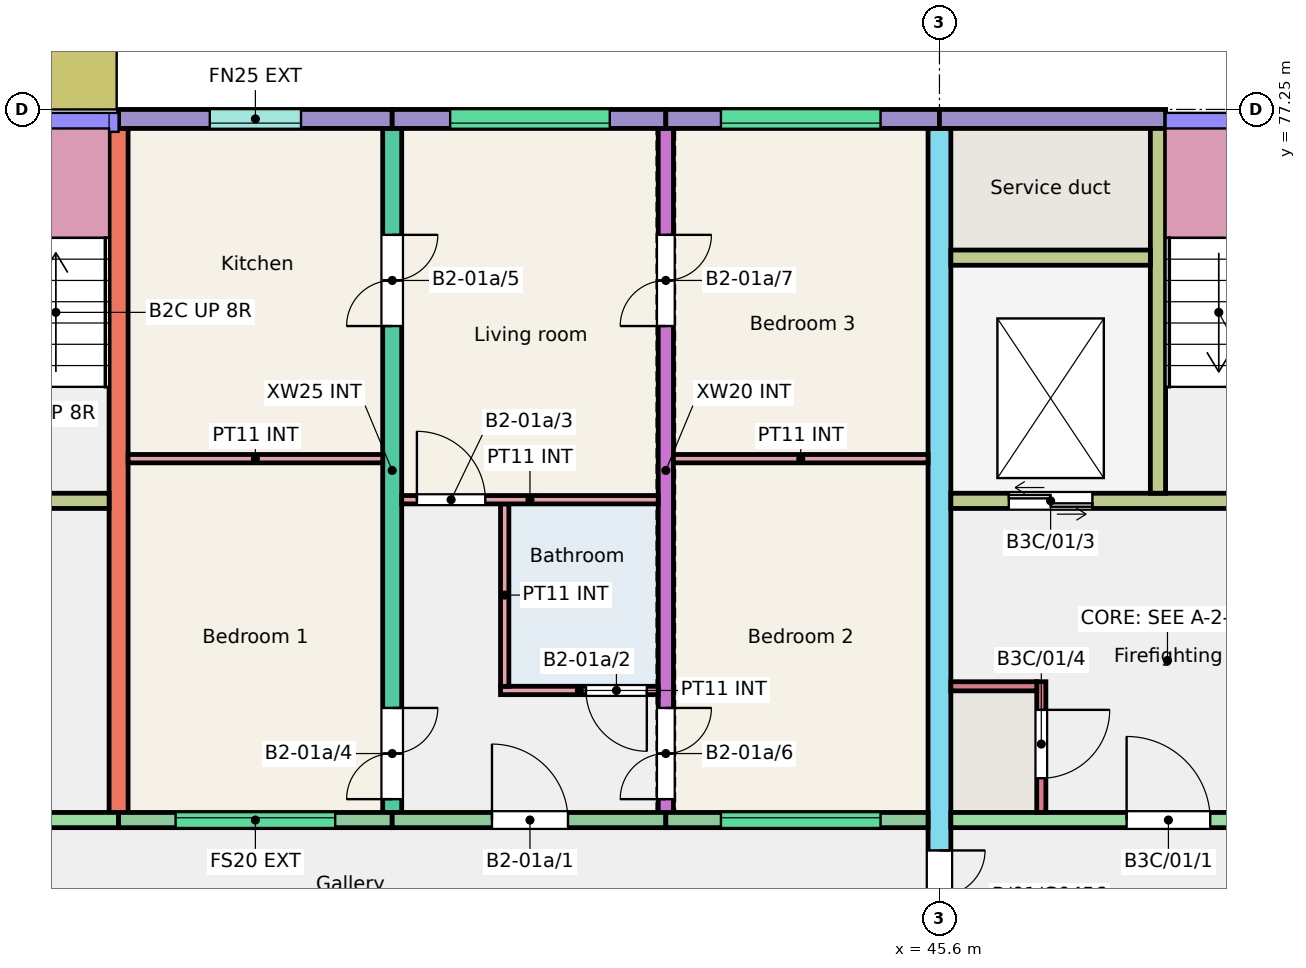
"""IFC4 building model, lengths in metres.
Left out: names, types, materials, properties, quantities, classifications, styles, units other than length and angle.
Written with IfcOpenShell. Run it as: python <this file> out.ifc"""

import sys

from ifc_helpers import new_model, si_unit, direction, frame, frame_2d, origin, place, context, subcontext, project, spatial, rectangle, extrude, element, fill, save


model = new_model("IFC4")
c1 = context("Model", 3, precision=1e-05, world=origin(), true_north=direction((0.0, 1.0)))
c2 = subcontext(c1, "Body", "Model", "MODEL_VIEW")
j1 = project(units=[si_unit("LENGTHUNIT", "METRE"), si_unit("PLANEANGLEUNIT", "RADIAN")], contexts=[c1])
p1 = place(None, origin())
s1 = spatial("IfcSite", under=j1, at=p1, CompositionType="ELEMENT")
p2 = place(p1, origin())
s2 = spatial("IfcBuilding", under=s1, at=p2, CompositionType="ELEMENT")
p3 = place(p2, frame((0.0, 0.0, 3.0)))
s3 = spatial("IfcBuildingStorey", under=s2, at=p3, CompositionType="ELEMENT", Elevation=3.0)
p4 = place(p3, frame((34.8, 68.0, 0.0), z_axis=(0.0, 0.0, 1.0), x_axis=(0.0, 1.0, 0.0)))
e1 = element("IfcWall", 1, at=p4, inside=s3, PredefinedType="SHEAR", context=c2, shape_type="SweptSolid", body=[
    extrude(rectangle(XDim=9.0, YDim=0.25, at=frame_2d((4.5, 0.0))), origin(), (0.0, 0.0, 1.0), 3.0),
])
p5 = place(p3, frame((38.4, 68.0, 0.0), z_axis=(0.0, 0.0, 1.0), x_axis=(0.0, 1.0, 0.0)))
e2 = element("IfcWall", 2, at=p5, inside=s3, PredefinedType="SHEAR", context=c2, shape_type="SweptSolid", body=[
    extrude(rectangle(XDim=9.0, YDim=0.25, at=frame_2d((4.5, 0.0))), origin(), (0.0, 0.0, 1.0), 3.0),
])
p6 = place(p5, frame((0.175, 0.0, 0.0)))
e3 = element("IfcOpeningElement", 3, at=p6, cuts=e2, PredefinedType="OPENING", context=c2, shape_type="SweptSolid", body=[
    extrude(rectangle(XDim=1.2, YDim=2.1, at=frame_2d((0.6, 1.05))), frame((0.0, 0.135, 0.0), z_axis=(0.0, -1.0, 0.0), x_axis=(1.0, 0.0, 0.0)), (0.0, 0.0, 1.0), 0.27),
])
p7 = place(p5, frame((6.4, 0.0, 0.0)))
e4 = element("IfcOpeningElement", 4, at=p7, cuts=e2, PredefinedType="OPENING", context=c2, shape_type="SweptSolid", body=[
    extrude(rectangle(XDim=1.2, YDim=2.1, at=frame_2d((0.6, 1.05))), frame((0.0, 0.135, 0.0), z_axis=(0.0, -1.0, 0.0), x_axis=(1.0, 0.0, 0.0)), (0.0, 0.0, 1.0), 0.27),
])
p8 = place(p3, frame((42.0, 68.0, 0.0), z_axis=(0.0, 0.0, 1.0), x_axis=(0.0, 1.0, 0.0)))
e5 = element("IfcWall", 5, at=p8, inside=s3, PredefinedType="SHEAR", context=c2, shape_type="SweptSolid", body=[
    extrude(rectangle(XDim=9.0, YDim=0.2, at=frame_2d((4.5, 0.0))), origin(), (0.0, 0.0, 1.0), 3.0),
])
p9 = place(p8, frame((0.175, 0.0, 0.0)))
e6 = element("IfcOpeningElement", 6, at=p9, cuts=e5, PredefinedType="OPENING", context=c2, shape_type="SweptSolid", body=[
    extrude(rectangle(XDim=1.2, YDim=2.1, at=frame_2d((0.6, 1.05))), frame((0.0, 0.11, 0.0), z_axis=(0.0, -1.0, 0.0), x_axis=(1.0, 0.0, 0.0)), (0.0, 0.0, 1.0), 0.22),
])
p10 = place(p8, frame((6.4, 0.0, 0.0)))
e7 = element("IfcOpeningElement", 7, at=p10, cuts=e5, PredefinedType="OPENING", context=c2, shape_type="SweptSolid", body=[
    extrude(rectangle(XDim=1.2, YDim=2.1, at=frame_2d((0.6, 1.05))), frame((0.0, 0.11, 0.0), z_axis=(0.0, -1.0, 0.0), x_axis=(1.0, 0.0, 0.0)), (0.0, 0.0, 1.0), 0.22),
])
p11 = place(p3, frame((45.6, 66.0, 0.0), z_axis=(0.0, 0.0, 1.0), x_axis=(0.0, 1.0, 0.0)))
e8 = element("IfcWall", 8, at=p11, inside=s3, PredefinedType="SHEAR", context=c2, shape_type="SweptSolid", body=[
    extrude(rectangle(XDim=11.0, YDim=0.3, at=frame_2d((5.5, 0.0))), origin(), (0.0, 0.0, 1.0), 3.0),
])
p12 = place(p11, frame((0.3, 0.0, 0.0)))
e9 = element("IfcOpeningElement", 9, at=p12, cuts=e8, PredefinedType="OPENING", context=c2, shape_type="SweptSolid", body=[
    extrude(rectangle(XDim=1.2, YDim=2.1, at=frame_2d((0.6, 1.05))), frame((0.0, 0.16, 0.0), z_axis=(0.0, -1.0, 0.0), x_axis=(1.0, 0.0, 0.0)), (0.0, 0.0, 1.0), 0.32),
])
p13 = place(p3, frame((28.95, 67.9, 0.0), z_axis=(0.0, 0.0, 1.0), x_axis=(1.0, 0.0, 0.0)))
e10 = element("IfcWall", 10, at=p13, inside=s3, PredefinedType="SHEAR", context=c2, shape_type="SweptSolid", body=[
    extrude(rectangle(XDim=5.85, YDim=0.2, at=frame_2d((2.925, 0.0))), origin(), (0.0, 0.0, 1.0), 3.0),
])
p14 = place(p13, frame((2.312, 0.0, 0.0)))
e11 = element("IfcOpeningElement", 11, at=p14, cuts=e10, PredefinedType="OPENING", context=c2, shape_type="SweptSolid", body=[
    extrude(rectangle(XDim=1.1, YDim=2.1, at=frame_2d((0.55, 1.05))), frame((0.0, 0.11, 0.0), z_axis=(0.0, -1.0, 0.0), x_axis=(1.0, 0.0, 0.0)), (0.0, 0.0, 1.0), 0.22),
])
p15 = place(p3, frame((28.95, 72.1, 0.0), z_axis=(0.0, 0.0, 1.0), x_axis=(1.0, 0.0, 0.0)))
e12 = element("IfcWall", 12, at=p15, inside=s3, PredefinedType="SHEAR", context=c2, shape_type="SweptSolid", body=[
    extrude(rectangle(XDim=5.725, YDim=0.2, at=frame_2d((2.863, 0.0))), origin(), (0.0, 0.0, 1.0), 3.0),
])
p16 = place(p15, frame((3.775, 0.0, 0.0)))
e13 = element("IfcOpeningElement", 13, at=p16, cuts=e12, PredefinedType="OPENING", context=c2, shape_type="SweptSolid", body=[
    extrude(rectangle(XDim=1.0, YDim=2.1, at=frame_2d((0.5, 1.05))), frame((0.0, 0.11, 0.0), z_axis=(0.0, -1.0, 0.0), x_axis=(1.0, 0.0, 0.0)), (0.0, 0.0, 1.0), 0.22),
])
p17 = place(p15, frame((0.762, 0.0, 0.0)))
e14 = element("IfcOpeningElement", 14, at=p17, cuts=e12, PredefinedType="OPENING", context=c2, shape_type="SweptSolid", body=[
    extrude(rectangle(XDim=1.1, YDim=2.1, at=frame_2d((0.55, 1.05))), frame((0.0, 0.11, 0.0), z_axis=(0.0, -1.0, 0.0), x_axis=(1.0, 0.0, 0.0)), (0.0, 0.0, 1.0), 0.22),
])
p18 = place(p3, frame((34.8, 77.125, 0.0), z_axis=(0.0, 0.0, 1.0), x_axis=(1.0, 0.0, 0.0)))
e15 = element("IfcWall", 15, at=p18, inside=s3, PredefinedType="SOLIDWALL", context=c2, shape_type="SweptSolid", body=[
    extrude(rectangle(XDim=3.6, YDim=0.25, at=frame_2d((1.8, 0.0))), origin(), (0.0, 0.0, 1.0), 3.0),
])
p19 = place(p18, frame((1.2, 0.0, 1.1)))
e16 = element("IfcOpeningElement", 16, at=p19, cuts=e15, PredefinedType="OPENING", context=c2, shape_type="SweptSolid", body=[
    extrude(rectangle(XDim=1.2, YDim=1.3, at=frame_2d((0.6, 0.65))), frame((0.0, 0.135, 0.0), z_axis=(0.0, -1.0, 0.0), x_axis=(1.0, 0.0, 0.0)), (0.0, 0.0, 1.0), 0.27),
])
p20 = place(p3, frame((34.8, 67.9, 0.0), z_axis=(0.0, 0.0, 1.0), x_axis=(1.0, 0.0, 0.0)))
e17 = element("IfcWall", 17, at=p20, inside=s3, PredefinedType="SOLIDWALL", context=c2, shape_type="SweptSolid", body=[
    extrude(rectangle(XDim=3.6, YDim=0.2, at=frame_2d((1.8, 0.0))), origin(), (0.0, 0.0, 1.0), 3.0),
])
p21 = place(p20, frame((0.75, 0.0, 1.2)))
e18 = element("IfcOpeningElement", 18, at=p21, cuts=e17, PredefinedType="OPENING", context=c2, shape_type="SweptSolid", body=[
    extrude(rectangle(XDim=2.1, YDim=1.2, at=frame_2d((1.05, 0.6))), frame((0.0, 0.11, 0.0), z_axis=(0.0, -1.0, 0.0), x_axis=(1.0, 0.0, 0.0)), (0.0, 0.0, 1.0), 0.22),
])
p22 = place(p3, frame((38.4, 77.125, 0.0), z_axis=(0.0, 0.0, 1.0), x_axis=(1.0, 0.0, 0.0)))
e19 = element("IfcWall", 19, at=p22, inside=s3, PredefinedType="SOLIDWALL", context=c2, shape_type="SweptSolid", body=[
    extrude(rectangle(XDim=3.6, YDim=0.25, at=frame_2d((1.8, 0.0))), origin(), (0.0, 0.0, 1.0), 3.0),
])
p23 = place(p22, frame((0.762, 0.0, 1.2)))
e20 = element("IfcOpeningElement", 20, at=p23, cuts=e19, PredefinedType="OPENING", context=c2, shape_type="SweptSolid", body=[
    extrude(rectangle(XDim=2.1, YDim=1.2, at=frame_2d((1.05, 0.6))), frame((0.0, 0.135, 0.0), z_axis=(0.0, -1.0, 0.0), x_axis=(1.0, 0.0, 0.0)), (0.0, 0.0, 1.0), 0.27),
])
p24 = place(p3, frame((38.4, 67.9, 0.0), z_axis=(0.0, 0.0, 1.0), x_axis=(1.0, 0.0, 0.0)))
e21 = element("IfcWall", 21, at=p24, inside=s3, PredefinedType="SOLIDWALL", context=c2, shape_type="SweptSolid", body=[
    extrude(rectangle(XDim=3.6, YDim=0.2, at=frame_2d((1.8, 0.0))), origin(), (0.0, 0.0, 1.0), 3.0),
])
p25 = place(p24, frame((1.312, 0.0, 0.0)))
e22 = element("IfcOpeningElement", 22, at=p25, cuts=e21, PredefinedType="OPENING", context=c2, shape_type="SweptSolid", body=[
    extrude(rectangle(XDim=1.0, YDim=2.1, at=frame_2d((0.5, 1.05))), frame((0.0, 0.11, 0.0), z_axis=(0.0, -1.0, 0.0), x_axis=(1.0, 0.0, 0.0)), (0.0, 0.0, 1.0), 0.22),
])
p26 = place(p3, frame((42.0, 77.125, 0.0), z_axis=(0.0, 0.0, 1.0), x_axis=(1.0, 0.0, 0.0)))
e23 = element("IfcWall", 23, at=p26, inside=s3, PredefinedType="SOLIDWALL", context=c2, shape_type="SweptSolid", body=[
    extrude(rectangle(XDim=3.6, YDim=0.25, at=frame_2d((1.8, 0.0))), origin(), (0.0, 0.0, 1.0), 3.0),
])
p27 = place(p26, frame((0.725, 0.0, 1.2)))
e24 = element("IfcOpeningElement", 24, at=p27, cuts=e23, PredefinedType="OPENING", context=c2, shape_type="SweptSolid", body=[
    extrude(rectangle(XDim=2.1, YDim=1.2, at=frame_2d((1.05, 0.6))), frame((0.0, 0.135, 0.0), z_axis=(0.0, -1.0, 0.0), x_axis=(1.0, 0.0, 0.0)), (0.0, 0.0, 1.0), 0.27),
])
p28 = place(p3, frame((42.0, 67.9, 0.0), z_axis=(0.0, 0.0, 1.0), x_axis=(1.0, 0.0, 0.0)))
e25 = element("IfcWall", 25, at=p28, inside=s3, PredefinedType="SOLIDWALL", context=c2, shape_type="SweptSolid", body=[
    extrude(rectangle(XDim=3.45, YDim=0.2, at=frame_2d((1.725, 0.0))), origin(), (0.0, 0.0, 1.0), 3.0),
])
p29 = place(p28, frame((0.725, 0.0, 1.2)))
e26 = element("IfcOpeningElement", 26, at=p29, cuts=e25, PredefinedType="OPENING", context=c2, shape_type="SweptSolid", body=[
    extrude(rectangle(XDim=2.1, YDim=1.2, at=frame_2d((1.05, 0.6))), frame((0.0, 0.11, 0.0), z_axis=(0.0, -1.0, 0.0), x_axis=(1.0, 0.0, 0.0)), (0.0, 0.0, 1.0), 0.22),
])
p30 = place(p3, frame((45.6, 77.125, 0.0), z_axis=(0.0, 0.0, 1.0), x_axis=(1.0, 0.0, 0.0)))
e27 = element("IfcWall", 27, at=p30, inside=s3, PredefinedType="SOLIDWALL", context=c2, shape_type="SweptSolid", body=[
    extrude(rectangle(XDim=2.975, YDim=0.25, at=frame_2d((1.487, 0.0))), origin(), (0.0, 0.0, 1.0), 3.0),
])
p31 = place(p3, frame((45.75, 67.9, 0.0), z_axis=(0.0, 0.0, 1.0), x_axis=(1.0, 0.0, 0.0)))
e28 = element("IfcWall", 28, at=p31, inside=s3, PredefinedType="SHEAR", context=c2, shape_type="SweptSolid", body=[
    extrude(rectangle(XDim=5.85, YDim=0.2, at=frame_2d((2.925, 0.0))), origin(), (0.0, 0.0, 1.0), 3.0),
])
p32 = place(p31, frame((2.312, 0.0, 0.0)))
e29 = element("IfcOpeningElement", 29, at=p32, cuts=e28, PredefinedType="OPENING", context=c2, shape_type="SweptSolid", body=[
    extrude(rectangle(XDim=1.1, YDim=2.1, at=frame_2d((0.55, 1.05))), frame((0.0, 0.11, 0.0), z_axis=(0.0, -1.0, 0.0), x_axis=(1.0, 0.0, 0.0)), (0.0, 0.0, 1.0), 0.22),
])
p33 = place(p3, frame((45.75, 72.1, 0.0), z_axis=(0.0, 0.0, 1.0), x_axis=(1.0, 0.0, 0.0)))
e30 = element("IfcWall", 30, at=p33, inside=s3, PredefinedType="SHEAR", context=c2, shape_type="SweptSolid", body=[
    extrude(rectangle(XDim=5.725, YDim=0.2, at=frame_2d((2.863, 0.0))), origin(), (0.0, 0.0, 1.0), 3.0),
])
p34 = place(p33, frame((3.775, 0.0, 0.0)))
e31 = element("IfcOpeningElement", 31, at=p34, cuts=e30, PredefinedType="OPENING", context=c2, shape_type="SweptSolid", body=[
    extrude(rectangle(XDim=1.0, YDim=2.1, at=frame_2d((0.5, 1.05))), frame((0.0, 0.11, 0.0), z_axis=(0.0, -1.0, 0.0), x_axis=(1.0, 0.0, 0.0)), (0.0, 0.0, 1.0), 0.22),
])
p35 = place(p33, frame((0.762, 0.0, 0.0)))
e32 = element("IfcOpeningElement", 32, at=p35, cuts=e30, PredefinedType="OPENING", context=c2, shape_type="SweptSolid", body=[
    extrude(rectangle(XDim=1.1, YDim=2.1, at=frame_2d((0.55, 1.05))), frame((0.0, 0.11, 0.0), z_axis=(0.0, -1.0, 0.0), x_axis=(1.0, 0.0, 0.0)), (0.0, 0.0, 1.0), 0.22),
])
p36 = place(p3, frame((48.475, 72.2, 0.0), z_axis=(0.0, 0.0, 1.0), x_axis=(0.0, 1.0, 0.0)))
e33 = element("IfcWall", 33, at=p36, inside=s3, PredefinedType="SHEAR", context=c2, shape_type="SweptSolid", body=[
    extrude(rectangle(XDim=4.8, YDim=0.2, at=frame_2d((2.4, 0.0))), origin(), (0.0, 0.0, 1.0), 3.0),
])
p37 = place(p3, frame((45.75, 75.3, 0.0), z_axis=(0.0, 0.0, 1.0), x_axis=(1.0, 0.0, 0.0)))
e34 = element("IfcWall", 34, at=p37, inside=s3, PredefinedType="SHEAR", context=c2, shape_type="SweptSolid", body=[
    extrude(rectangle(XDim=2.625, YDim=0.2, at=frame_2d((1.312, 0.0))), origin(), (0.0, 0.0, 1.0), 3.0),
])
p38 = place(p3, frame((46.94, 68.0, 0.0), z_axis=(0.0, 0.0, 1.0), x_axis=(0.0, 1.0, 0.0)))
e35 = element("IfcWall", 35, at=p38, inside=s3, PredefinedType="SHEAR", context=c2, shape_type="SweptSolid", body=[
    extrude(rectangle(XDim=1.72, YDim=0.12, at=frame_2d((0.86, 0.0))), origin(), (0.0, 0.0, 1.0), 3.0),
])
p39 = place(p38, frame((0.45, 0.0, 0.0)))
e36 = element("IfcOpeningElement", 36, at=p39, cuts=e35, PredefinedType="OPENING", context=c2, shape_type="SweptSolid", body=[
    extrude(rectangle(XDim=0.9, YDim=2.1, at=frame_2d((0.45, 1.05))), frame((0.0, 0.07, 0.0), z_axis=(0.0, -1.0, 0.0), x_axis=(1.0, 0.0, 0.0)), (0.0, 0.0, 1.0), 0.14),
])
p40 = place(p3, frame((45.75, 69.66, 0.0), z_axis=(0.0, 0.0, 1.0), x_axis=(1.0, 0.0, 0.0)))
e37 = element("IfcWall", 37, at=p40, inside=s3, PredefinedType="SHEAR", context=c2, shape_type="SweptSolid", body=[
    extrude(rectangle(XDim=1.13, YDim=0.12, at=frame_2d((0.565, 0.0))), origin(), (0.0, 0.0, 1.0), 3.0),
])
p41 = place(p3, frame((39.825, 69.605, 0.0), z_axis=(0.0, 0.0, 1.0), x_axis=(1.0, 0.0, 0.0)))
e38 = element("IfcWall", 38, at=p41, inside=s3, PredefinedType="PARTITIONING", context=c2, shape_type="SweptSolid", body=[
    extrude(rectangle(XDim=2.075, YDim=0.11, at=frame_2d((1.038, 0.0))), origin(), (0.0, 0.0, 1.0), 2.8),
])
p42 = place(p41, frame((1.125, 0.0, 0.0)))
e39 = element("IfcOpeningElement", 39, at=p42, cuts=e38, PredefinedType="OPENING", context=c2, shape_type="SweptSolid", body=[
    extrude(rectangle(XDim=0.8, YDim=2.1, at=frame_2d((0.4, 1.05))), frame((0.0, 0.065, 0.0), z_axis=(0.0, -1.0, 0.0), x_axis=(1.0, 0.0, 0.0)), (0.0, 0.0, 1.0), 0.13),
])
p43 = place(p3, frame((39.88, 69.66, 0.0), z_axis=(0.0, 0.0, 1.0), x_axis=(0.0, 1.0, 0.0)))
e40 = element("IfcWall", 40, at=p43, inside=s3, PredefinedType="PARTITIONING", context=c2, shape_type="SweptSolid", body=[
    extrude(rectangle(XDim=2.4, YDim=0.11, at=frame_2d((1.2, 0.0))), origin(), (0.0, 0.0, 1.0), 2.8),
])
p44 = place(p3, frame((38.525, 72.115, 0.0), z_axis=(0.0, 0.0, 1.0), x_axis=(1.0, 0.0, 0.0)))
e41 = element("IfcWall", 41, at=p44, inside=s3, PredefinedType="PARTITIONING", context=c2, shape_type="SweptSolid", body=[
    extrude(rectangle(XDim=3.375, YDim=0.11, at=frame_2d((1.688, 0.0))), origin(), (0.0, 0.0, 1.0), 2.8),
])
p45 = place(p44, frame((0.2, 0.0, 0.0)))
e42 = element("IfcOpeningElement", 42, at=p45, cuts=e41, PredefinedType="OPENING", context=c2, shape_type="SweptSolid", body=[
    extrude(rectangle(XDim=0.9, YDim=2.1, at=frame_2d((0.45, 1.05))), frame((0.0, 0.065, 0.0), z_axis=(0.0, -1.0, 0.0), x_axis=(1.0, 0.0, 0.0)), (0.0, 0.0, 1.0), 0.13),
])
for number, where, z_axis, x_axis in (
    (43, (34.925, 72.655, 0.0), (0.0, 0.0, 1.0), (1.0, 0.0, 0.0)),
    (44, (42.1, 72.655, 0.0), (0.0, 0.0, 1.0), (1.0, 0.0, 0.0)),
):
    element("IfcWall", number, at=place(p3, frame(where, z_axis=z_axis, x_axis=x_axis)), inside=s3, PredefinedType="PARTITIONING", context=c2, shape_type="SweptSolid", body=[
        extrude(rectangle(XDim=3.35, YDim=0.11, at=frame_2d((1.675, 0.0))), origin(), (0.0, 0.0, 1.0), 2.8),
    ])
p46 = place(p21, origin())
e45 = element("IfcWindow", 45, at=p46, inside=s3, PartitioningType="SINGLE_PANEL", PredefinedType="WINDOW", context=c2, shape_type="SweptSolid", body=[
    extrude(rectangle(XDim=2.1, YDim=1.2, at=frame_2d((1.05, 0.6))), frame((0.0, 0.06, 0.0), z_axis=(0.0, -1.0, 0.0), x_axis=(1.0, 0.0, 0.0)), (0.0, 0.0, 1.0), 0.06),
])
fill(e18, e45)
p47 = place(p19, origin())
e46 = element("IfcWindow", 46, at=p47, inside=s3, PartitioningType="SINGLE_PANEL", PredefinedType="WINDOW", context=c2, shape_type="SweptSolid", body=[
    extrude(rectangle(XDim=1.2, YDim=1.3, at=frame_2d((0.6, 0.65))), frame((0.0, -0.025, 0.0), z_axis=(0.0, -1.0, 0.0), x_axis=(1.0, 0.0, 0.0)), (0.0, 0.0, 1.0), 0.06),
])
fill(e16, e46)
p48 = place(p29, origin())
e47 = element("IfcWindow", 47, at=p48, inside=s3, PartitioningType="SINGLE_PANEL", PredefinedType="WINDOW", context=c2, shape_type="SweptSolid", body=[
    extrude(rectangle(XDim=2.1, YDim=1.2, at=frame_2d((1.05, 0.6))), frame((0.0, 0.06, 0.0), z_axis=(0.0, -1.0, 0.0), x_axis=(1.0, 0.0, 0.0)), (0.0, 0.0, 1.0), 0.06),
])
fill(e26, e47)
p49 = place(p27, origin())
e48 = element("IfcWindow", 48, at=p49, inside=s3, PartitioningType="SINGLE_PANEL", PredefinedType="WINDOW", context=c2, shape_type="SweptSolid", body=[
    extrude(rectangle(XDim=2.1, YDim=1.2, at=frame_2d((1.05, 0.6))), frame((0.0, -0.025, 0.0), z_axis=(0.0, -1.0, 0.0), x_axis=(1.0, 0.0, 0.0)), (0.0, 0.0, 1.0), 0.06),
])
fill(e24, e48)
p50 = place(p23, origin())
e49 = element("IfcWindow", 49, at=p50, inside=s3, PartitioningType="SINGLE_PANEL", PredefinedType="WINDOW", context=c2, shape_type="SweptSolid", body=[
    extrude(rectangle(XDim=2.1, YDim=1.2, at=frame_2d((1.05, 0.6))), frame((0.0, -0.025, 0.0), z_axis=(0.0, -1.0, 0.0), x_axis=(1.0, 0.0, 0.0)), (0.0, 0.0, 1.0), 0.06),
])
fill(e20, e49)
p51 = place(p25, origin())
e50 = element("IfcDoor", 50, at=p51, inside=s3, OperationType="SINGLE_SWING_LEFT", PredefinedType="DOOR", context=c2, shape_type="SweptSolid", body=[
    extrude(rectangle(XDim=1.0, YDim=2.1, at=frame_2d((0.5, 1.05))), frame((0.0, 0.025, 0.0), z_axis=(0.0, -1.0, 0.0), x_axis=(1.0, 0.0, 0.0)), (0.0, 0.0, 1.0), 0.05),
])
fill(e22, e50)
p52 = place(p42, origin())
e51 = element("IfcDoor", 51, at=p52, inside=s3, OperationType="SINGLE_SWING_RIGHT", PredefinedType="DOOR", context=c2, shape_type="SweptSolid", body=[
    extrude(rectangle(XDim=0.8, YDim=2.1, at=frame_2d((0.4, 1.05))), frame((0.0, 0.025, 0.0), z_axis=(0.0, -1.0, 0.0), x_axis=(1.0, 0.0, 0.0)), (0.0, 0.0, 1.0), 0.05),
])
fill(e39, e51)
p53 = place(p45, origin())
e52 = element("IfcDoor", 52, at=p53, inside=s3, OperationType="SINGLE_SWING_LEFT", PredefinedType="DOOR", context=c2, shape_type="SweptSolid", body=[
    extrude(rectangle(XDim=0.9, YDim=2.1, at=frame_2d((0.45, 1.05))), frame((0.0, 0.025, 0.0), z_axis=(0.0, -1.0, 0.0), x_axis=(1.0, 0.0, 0.0)), (0.0, 0.0, 1.0), 0.05),
])
fill(e42, e52)
p54 = place(p6, origin())
e53 = element("IfcDoor", 53, at=p54, inside=s3, OperationType="DOUBLE_DOOR_SINGLE_SWING", PredefinedType="DOOR", context=c2, shape_type="SweptSolid", body=[
    extrude(rectangle(XDim=1.2, YDim=2.1, at=frame_2d((0.6, 1.05))), frame((0.0, 0.025, 0.0), z_axis=(0.0, -1.0, 0.0), x_axis=(1.0, 0.0, 0.0)), (0.0, 0.0, 1.0), 0.05),
])
fill(e3, e53)
p55 = place(p7, origin())
e54 = element("IfcDoor", 54, at=p55, inside=s3, OperationType="DOUBLE_DOOR_SINGLE_SWING", PredefinedType="DOOR", context=c2, shape_type="SweptSolid", body=[
    extrude(rectangle(XDim=1.2, YDim=2.1, at=frame_2d((0.6, 1.05))), frame((0.0, 0.025, 0.0), z_axis=(0.0, -1.0, 0.0), x_axis=(1.0, 0.0, 0.0)), (0.0, 0.0, 1.0), 0.05),
])
fill(e4, e54)
p56 = place(p9, origin())
e55 = element("IfcDoor", 55, at=p56, inside=s3, OperationType="DOUBLE_DOOR_SINGLE_SWING", PredefinedType="DOOR", context=c2, shape_type="SweptSolid", body=[
    extrude(rectangle(XDim=1.2, YDim=2.1, at=frame_2d((0.6, 1.05))), frame((0.0, 0.025, 0.0), z_axis=(0.0, -1.0, 0.0), x_axis=(1.0, 0.0, 0.0)), (0.0, 0.0, 1.0), 0.05),
])
fill(e6, e55)
p57 = place(p10, origin())
e56 = element("IfcDoor", 56, at=p57, inside=s3, OperationType="DOUBLE_DOOR_SINGLE_SWING", PredefinedType="DOOR", context=c2, shape_type="SweptSolid", body=[
    extrude(rectangle(XDim=1.2, YDim=2.1, at=frame_2d((0.6, 1.05))), frame((0.0, 0.025, 0.0), z_axis=(0.0, -1.0, 0.0), x_axis=(1.0, 0.0, 0.0)), (0.0, 0.0, 1.0), 0.05),
])
fill(e7, e56)
p58 = place(p32, origin())
e57 = element("IfcDoor", 57, at=p58, inside=s3, OperationType="SINGLE_SWING_LEFT", PredefinedType="DOOR", context=c2, shape_type="SweptSolid", body=[
    extrude(rectangle(XDim=1.1, YDim=2.1, at=frame_2d((0.55, 1.05))), frame((0.0, 0.025, 0.0), z_axis=(0.0, -1.0, 0.0), x_axis=(1.0, 0.0, 0.0)), (0.0, 0.0, 1.0), 0.05),
])
fill(e29, e57)
p59 = place(p35, origin())
e58 = element("IfcDoor", 58, at=p59, inside=s3, OperationType="DOUBLE_DOOR_SLIDING", PredefinedType="DOOR", context=c2, shape_type="SweptSolid", body=[
    extrude(rectangle(XDim=1.1, YDim=2.1, at=frame_2d((0.55, 1.05))), frame((0.0, 0.025, 0.0), z_axis=(0.0, -1.0, 0.0), x_axis=(1.0, 0.0, 0.0)), (0.0, 0.0, 1.0), 0.05),
])
fill(e32, e58)
p60 = place(p39, origin())
e59 = element("IfcDoor", 59, at=p60, inside=s3, OperationType="SINGLE_SWING_RIGHT", PredefinedType="DOOR", context=c2, shape_type="SweptSolid", body=[
    extrude(rectangle(XDim=0.9, YDim=2.1, at=frame_2d((0.45, 1.05))), frame((0.0, 0.025, 0.0), z_axis=(0.0, -1.0, 0.0), x_axis=(1.0, 0.0, 0.0)), (0.0, 0.0, 1.0), 0.05),
])
fill(e36, e59)
p61 = place(p12, origin())
e60 = element("IfcDoor", 60, at=p61, inside=s3, OperationType="DOUBLE_DOOR_SINGLE_SWING", PredefinedType="DOOR", context=c2, shape_type="SweptSolid", body=[
    extrude(rectangle(XDim=1.2, YDim=2.1, at=frame_2d((0.6, 1.05))), frame((0.0, 0.025, 0.0), z_axis=(0.0, -1.0, 0.0), x_axis=(1.0, 0.0, 0.0)), (0.0, 0.0, 1.0), 0.05),
])
fill(e9, e60)
save(model, sys.argv[1])
